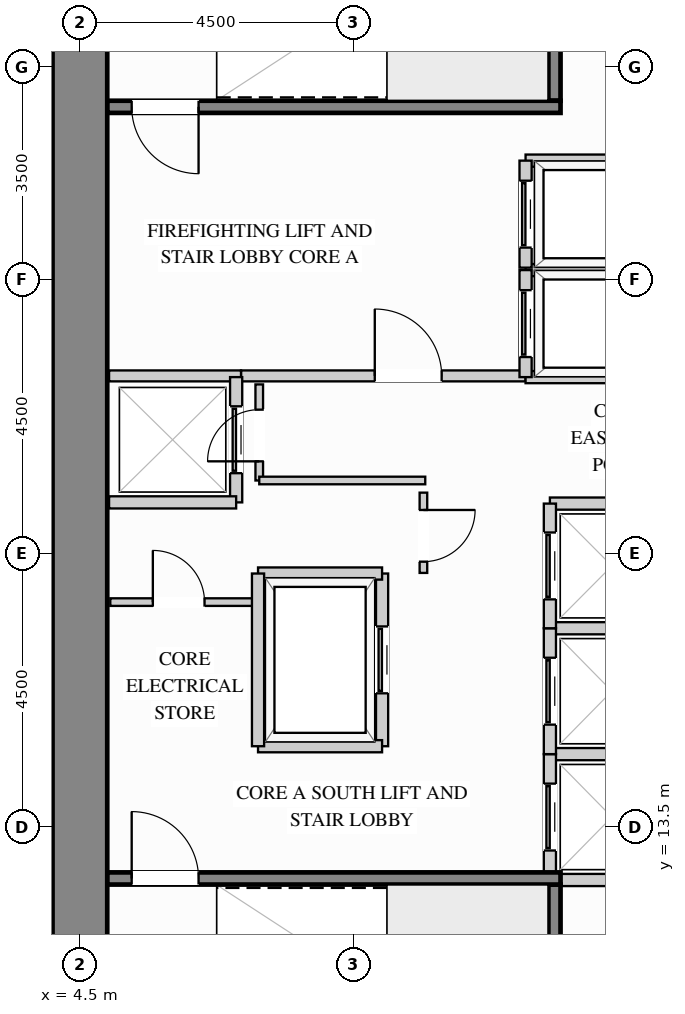
"""IFC4 building model, lengths in metres.
Left out: names, types, materials, properties, quantities, classifications, styles, units other than length and angle.
Written with IfcOpenShell. Run it as: python <this file> out.ifc"""

import sys

from ifc_helpers import new_model, si_unit, direction, frame, frame_2d, origin, place, context, subcontext, project, spatial, rectangle, extrude, source, transform, mapped, element, fill, save


model = new_model("IFC4")
c1 = context("Model", 3, precision=1e-05, world=origin(), true_north=direction((0.0, 1.0)))
c2 = subcontext(c1, "Body", "Model", "MODEL_VIEW")
j1 = project(units=[si_unit("LENGTHUNIT", "METRE"), si_unit("PLANEANGLEUNIT", "RADIAN")], contexts=[c1])
p1 = place(None, origin())
s1 = spatial("IfcSite", under=j1, at=p1, CompositionType="ELEMENT")
p2 = place(p1, origin())
s2 = spatial("IfcBuilding", under=s1, at=p2, CompositionType="ELEMENT")
p3 = place(p2, frame((0.0, 0.0, 54.9)))
s3 = spatial("IfcBuildingStorey", under=s2, at=p3, CompositionType="ELEMENT", Elevation=54.9)
m1 = source(origin(), c2, "Body", "SweptSolid", [
    extrude(rectangle(XDim=20.1, YDim=0.9, at=frame_2d((10.05, 0.0))), origin(), (0.0, 0.0, 1.0), 3.38),
])
p4 = place(p3, frame((4.5, 8.95, 0.0), z_axis=(0.0, 0.0, 1.0), x_axis=(0.0, 1.0, 0.0)))
e1 = element("IfcWall", 1, at=p4, inside=s3, PredefinedType="SHEAR", context=c2, shape_type="MappedRepresentation", body=[
    mapped(m1, transform((0.0, 0.0, 0.0), x_axis=(1.0, 0.0, 0.0), y_axis=(0.0, 1.0, 0.0), z_axis=(0.0, 0.0, 1.0))),
])
p5 = place(p3, frame((7.15, 20.92, 0.0), z_axis=(0.0, 0.0, 1.0), x_axis=(1.0, 0.0, 0.0)))
e2 = element("IfcWall", 2, at=p5, inside=s3, PredefinedType="PARTITIONING", context=c2, shape_type="SweptSolid", body=[
    extrude(rectangle(XDim=4.68, YDim=0.18, at=frame_2d((2.34, 0.0))), origin(), (0.0, 0.0, 1.0), 3.365),
])
p6 = place(p5, frame((2.2, 0.0, 0.0)))
e3 = element("IfcOpeningElement", 3, at=p6, cuts=e2, PredefinedType="OPENING", context=c2, shape_type="SweptSolid", body=[
    extrude(rectangle(XDim=1.1, YDim=2.15, at=frame_2d((0.55, 1.075))), frame((0.0, 0.1, 0.0), z_axis=(0.0, -1.0, 0.0), x_axis=(1.0, 0.0, 0.0)), (0.0, 0.0, 1.0), 0.2),
])
m2 = source(origin(), c2, "Body", "SweptSolid", [
    extrude(rectangle(XDim=2.17, YDim=0.18, at=frame_2d((1.085, 0.0))), origin(), (0.0, 0.0, 1.0), 3.365),
])
p7 = place(p3, frame((4.98, 20.92, 0.0), z_axis=(0.0, 0.0, 1.0), x_axis=(1.0, 0.0, 0.0)))
e4 = element("IfcWall", 4, at=p7, inside=s3, PredefinedType="PARTITIONING", context=c2, shape_type="MappedRepresentation", body=[
    mapped(m2, transform((0.0, 0.0, 0.0), x_axis=(1.0, 0.0, 0.0), y_axis=(0.0, 1.0, 0.0), z_axis=(0.0, 0.0, 1.0))),
])
p8 = place(p3, frame((10.15, 17.68, 0.0), z_axis=(0.0, 0.0, 1.0), x_axis=(0.0, 1.0, 0.0)))
e5 = element("IfcWall", 5, at=p8, inside=s3, PredefinedType="PARTITIONING", context=c2, shape_type="SweptSolid", body=[
    extrude(rectangle(XDim=1.32, YDim=0.125, at=frame_2d((0.66, 0.0))), origin(), (0.0, 0.0, 1.0), 3.365),
])
p9 = place(p8, frame((0.185, 0.0, 0.0)))
e6 = element("IfcOpeningElement", 6, at=p9, cuts=e5, PredefinedType="OPENING", context=c2, shape_type="SweptSolid", body=[
    extrude(rectangle(XDim=0.85, YDim=2.1, at=frame_2d((0.425, 1.05))), frame((0.0, 0.073, 0.0), z_axis=(0.0, -1.0, 0.0), x_axis=(1.0, 0.0, 0.0)), (0.0, 0.0, 1.0), 0.145),
])
p10 = place(p3, frame((7.45, 19.2, 0.0), z_axis=(0.0, 0.0, 1.0), x_axis=(0.0, 1.0, 0.0)))
e7 = element("IfcWall", 7, at=p10, inside=s3, PredefinedType="PARTITIONING", context=c2, shape_type="SweptSolid", body=[
    extrude(rectangle(XDim=1.58, YDim=0.125, at=frame_2d((0.79, 0.0))), origin(), (0.0, 0.0, 1.0), 3.365),
])
p11 = place(p10, frame((0.315, 0.0, 0.0)))
e8 = element("IfcOpeningElement", 8, at=p11, cuts=e7, PredefinedType="OPENING", context=c2, shape_type="SweptSolid", body=[
    extrude(rectangle(XDim=0.85, YDim=2.1, at=frame_2d((0.425, 1.05))), frame((0.0, 0.073, 0.0), z_axis=(0.0, -1.0, 0.0), x_axis=(1.0, 0.0, 0.0)), (0.0, 0.0, 1.0), 0.145),
])
m3 = source(origin(), c2, "Body", "SweptSolid", [
    extrude(rectangle(XDim=2.73, YDim=0.125, at=frame_2d((1.365, 0.0))), origin(), (0.0, 0.0, 1.0), 3.365),
])
p12 = place(p3, frame((7.45, 19.2, 0.0), z_axis=(0.0, 0.0, 1.0), x_axis=(1.0, 0.0, 0.0)))
e9 = element("IfcWall", 9, at=p12, inside=s3, PredefinedType="PARTITIONING", context=c2, shape_type="MappedRepresentation", body=[
    mapped(m3, transform((0.0, 0.0, 0.0), x_axis=(1.0, 0.0, 0.0), y_axis=(0.0, 1.0, 0.0), z_axis=(0.0, 0.0, 1.0))),
])
p13 = place(p3, frame((5.0, 17.2, 0.0), z_axis=(0.0, 0.0, 1.0), x_axis=(1.0, 0.0, 0.0)))
e10 = element("IfcWall", 10, at=p13, inside=s3, PredefinedType="PARTITIONING", context=c2, shape_type="SweptSolid", body=[
    extrude(rectangle(XDim=2.4, YDim=0.125, at=frame_2d((1.2, 0.0))), origin(), (0.0, 0.0, 1.0), 3.365),
])
p14 = place(p13, frame((0.7, 0.0, 0.0)))
e11 = element("IfcOpeningElement", 11, at=p14, cuts=e10, PredefinedType="OPENING", context=c2, shape_type="SweptSolid", body=[
    extrude(rectangle(XDim=0.85, YDim=2.1, at=frame_2d((0.425, 1.05))), frame((0.0, 0.073, 0.0), z_axis=(0.0, -1.0, 0.0), x_axis=(1.0, 0.0, 0.0)), (0.0, 0.0, 1.0), 0.145),
])
m4 = source(origin(), c2, "Body", "SweptSolid", [
    extrude(rectangle(XDim=2.19, YDim=0.2, at=frame_2d((1.095, 0.0))), origin(), (0.0, 0.0, 1.0), 3.365),
])
for number, where, z_axis, x_axis in (
    (12, (11.83, 22.66, 0.0), (0.0, 0.0, 1.0), (1.0, 0.0, 0.0)),
    (13, (11.83, 20.9, 0.0), (0.0, 0.0, 1.0), (1.0, 0.0, 0.0)),
):
    element("IfcWall", number, at=place(p3, frame(where, z_axis=z_axis, x_axis=x_axis)), inside=s3, PredefinedType="PARTITIONING", context=c2, shape_type="MappedRepresentation", body=[
        mapped(m4, transform((0.0, 0.0, 0.0), x_axis=(1.0, 0.0, 0.0), y_axis=(0.0, 1.0, 0.0), z_axis=(0.0, 0.0, 1.0))),
    ])
p15 = place(p3, frame((11.83, 20.9, 0.0), z_axis=(0.0, 0.0, 1.0), x_axis=(0.0, 1.0, 0.0)))
e14 = element("IfcWall", 14, at=p15, inside=s3, PredefinedType="PARTITIONING", context=c2, shape_type="SweptSolid", body=[
    extrude(rectangle(XDim=1.76, YDim=0.2, at=frame_2d((0.88, 0.0))), origin(), (0.0, 0.0, 1.0), 3.365),
])
p16 = place(p15, frame((0.33, 0.0, 0.0)))
e15 = element("IfcOpeningElement", 15, at=p16, cuts=e14, PredefinedType="OPENING", context=c2, shape_type="SweptSolid", body=[
    extrude(rectangle(XDim=1.1, YDim=2.2, at=frame_2d((0.55, 1.1))), frame((0.0, 0.11, 0.0), z_axis=(0.0, -1.0, 0.0), x_axis=(1.0, 0.0, 0.0)), (0.0, 0.0, 1.0), 0.22),
])
p17 = place(p3, frame((11.83, 24.46, 0.0), z_axis=(0.0, 0.0, 1.0), x_axis=(1.0, 0.0, 0.0)))
e16 = element("IfcWall", 16, at=p17, inside=s3, PredefinedType="PARTITIONING", context=c2, shape_type="MappedRepresentation", body=[
    mapped(m4, transform((0.0, 0.0, 0.0), x_axis=(1.0, 0.0, 0.0), y_axis=(0.0, 1.0, 0.0), z_axis=(0.0, 0.0, 1.0))),
])
p18 = place(p3, frame((11.83, 22.7, 0.0), z_axis=(0.0, 0.0, 1.0), x_axis=(0.0, 1.0, 0.0)))
e17 = element("IfcWall", 17, at=p18, inside=s3, PredefinedType="PARTITIONING", context=c2, shape_type="SweptSolid", body=[
    extrude(rectangle(XDim=1.76, YDim=0.2, at=frame_2d((0.88, 0.0))), origin(), (0.0, 0.0, 1.0), 3.365),
])
p19 = place(p18, frame((0.33, 0.0, 0.0)))
e18 = element("IfcOpeningElement", 18, at=p19, cuts=e17, PredefinedType="OPENING", context=c2, shape_type="SweptSolid", body=[
    extrude(rectangle(XDim=1.1, YDim=2.2, at=frame_2d((0.55, 1.1))), frame((0.0, 0.11, 0.0), z_axis=(0.0, -1.0, 0.0), x_axis=(1.0, 0.0, 0.0)), (0.0, 0.0, 1.0), 0.22),
])
m5 = source(origin(), c2, "Body", "SweptSolid", [
    extrude(rectangle(XDim=1.79, YDim=0.2, at=frame_2d((0.895, 0.0))), origin(), (0.0, 0.0, 1.0), 3.365),
])
for number, where, z_axis, x_axis in (
    (19, (12.23, 14.7, 0.0), (0.0, 0.0, 1.0), (1.0, 0.0, 0.0)),
    (20, (12.23, 12.63, 0.0), (0.0, 0.0, 1.0), (1.0, 0.0, 0.0)),
):
    element("IfcWall", number, at=place(p3, frame(where, z_axis=z_axis, x_axis=x_axis)), inside=s3, PredefinedType="PARTITIONING", context=c2, shape_type="MappedRepresentation", body=[
        mapped(m5, transform((0.0, 0.0, 0.0), x_axis=(1.0, 0.0, 0.0), y_axis=(0.0, 1.0, 0.0), z_axis=(0.0, 0.0, 1.0))),
    ])
p20 = place(p3, frame((12.23, 12.63, 0.0), z_axis=(0.0, 0.0, 1.0), x_axis=(0.0, 1.0, 0.0)))
e21 = element("IfcWall", 21, at=p20, inside=s3, PredefinedType="PARTITIONING", context=c2, shape_type="SweptSolid", body=[
    extrude(rectangle(XDim=2.07, YDim=0.2, at=frame_2d((1.035, 0.0))), origin(), (0.0, 0.0, 1.0), 3.365),
])
p21 = place(p20, frame((0.485, 0.0, 0.0)))
e22 = element("IfcOpeningElement", 22, at=p21, cuts=e21, PredefinedType="OPENING", context=c2, shape_type="SweptSolid", body=[
    extrude(rectangle(XDim=1.1, YDim=2.2, at=frame_2d((0.55, 1.1))), frame((0.0, 0.11, 0.0), z_axis=(0.0, -1.0, 0.0), x_axis=(1.0, 0.0, 0.0)), (0.0, 0.0, 1.0), 0.22),
])
p22 = place(p3, frame((12.23, 16.77, 0.0), z_axis=(0.0, 0.0, 1.0), x_axis=(1.0, 0.0, 0.0)))
e23 = element("IfcWall", 23, at=p22, inside=s3, PredefinedType="PARTITIONING", context=c2, shape_type="MappedRepresentation", body=[
    mapped(m5, transform((0.0, 0.0, 0.0), x_axis=(1.0, 0.0, 0.0), y_axis=(0.0, 1.0, 0.0), z_axis=(0.0, 0.0, 1.0))),
])
p23 = place(p3, frame((12.23, 14.7, 0.0), z_axis=(0.0, 0.0, 1.0), x_axis=(0.0, 1.0, 0.0)))
e24 = element("IfcWall", 24, at=p23, inside=s3, PredefinedType="PARTITIONING", context=c2, shape_type="SweptSolid", body=[
    extrude(rectangle(XDim=2.07, YDim=0.2, at=frame_2d((1.035, 0.0))), origin(), (0.0, 0.0, 1.0), 3.365),
])
p24 = place(p23, frame((0.485, 0.0, 0.0)))
e25 = element("IfcOpeningElement", 25, at=p24, cuts=e24, PredefinedType="OPENING", context=c2, shape_type="SweptSolid", body=[
    extrude(rectangle(XDim=1.1, YDim=2.2, at=frame_2d((0.55, 1.1))), frame((0.0, 0.11, 0.0), z_axis=(0.0, -1.0, 0.0), x_axis=(1.0, 0.0, 0.0)), (0.0, 0.0, 1.0), 0.22),
])
p25 = place(p3, frame((12.23, 18.82, 0.0), z_axis=(0.0, 0.0, 1.0), x_axis=(1.0, 0.0, 0.0)))
e26 = element("IfcWall", 26, at=p25, inside=s3, PredefinedType="PARTITIONING", context=c2, shape_type="MappedRepresentation", body=[
    mapped(m5, transform((0.0, 0.0, 0.0), x_axis=(1.0, 0.0, 0.0), y_axis=(0.0, 1.0, 0.0), z_axis=(0.0, 0.0, 1.0))),
])
p26 = place(p3, frame((12.23, 16.77, 0.0), z_axis=(0.0, 0.0, 1.0), x_axis=(0.0, 1.0, 0.0)))
e27 = element("IfcWall", 27, at=p26, inside=s3, PredefinedType="PARTITIONING", context=c2, shape_type="SweptSolid", body=[
    extrude(rectangle(XDim=2.05, YDim=0.2, at=frame_2d((1.025, 0.0))), origin(), (0.0, 0.0, 1.0), 3.365),
])
p27 = place(p26, frame((0.475, 0.0, 0.0)))
e28 = element("IfcOpeningElement", 28, at=p27, cuts=e27, PredefinedType="OPENING", context=c2, shape_type="SweptSolid", body=[
    extrude(rectangle(XDim=1.1, YDim=2.2, at=frame_2d((0.55, 1.1))), frame((0.0, 0.11, 0.0), z_axis=(0.0, -1.0, 0.0), x_axis=(1.0, 0.0, 0.0)), (0.0, 0.0, 1.0), 0.22),
])
p28 = place(p3, frame((7.07, 18.84, 0.0), z_axis=(0.0, 0.0, 1.0), x_axis=(0.0, 1.0, 0.0)))
e29 = element("IfcWall", 29, at=p28, inside=s3, PredefinedType="PARTITIONING", context=c2, shape_type="SweptSolid", body=[
    extrude(rectangle(XDim=2.06, YDim=0.2, at=frame_2d((1.03, 0.0))), origin(), (0.0, 0.0, 1.0), 3.365),
])
p29 = place(p28, frame((0.48, 0.0, 0.0)))
e30 = element("IfcOpeningElement", 30, at=p29, cuts=e29, PredefinedType="OPENING", context=c2, shape_type="SweptSolid", body=[
    extrude(rectangle(XDim=1.1, YDim=2.2, at=frame_2d((0.55, 1.1))), frame((0.0, 0.11, 0.0), z_axis=(0.0, -1.0, 0.0), x_axis=(1.0, 0.0, 0.0)), (0.0, 0.0, 1.0), 0.22),
])
m6 = source(origin(), c2, "Body", "SweptSolid", [
    extrude(rectangle(XDim=2.09, YDim=0.2, at=frame_2d((1.045, 0.0))), origin(), (0.0, 0.0, 1.0), 3.365),
])
p30 = place(p3, frame((4.98, 18.84, 0.0), z_axis=(0.0, 0.0, 1.0), x_axis=(1.0, 0.0, 0.0)))
e31 = element("IfcWall", 31, at=p30, inside=s3, PredefinedType="PARTITIONING", context=c2, shape_type="MappedRepresentation", body=[
    mapped(m6, transform((0.0, 0.0, 0.0), x_axis=(1.0, 0.0, 0.0), y_axis=(0.0, 1.0, 0.0), z_axis=(0.0, 0.0, 1.0))),
])
p31 = place(p3, frame((9.47, 14.83, 0.0), z_axis=(0.0, 0.0, 1.0), x_axis=(0.0, 1.0, 0.0)))
e32 = element("IfcWall", 32, at=p31, inside=s3, PredefinedType="PARTITIONING", context=c2, shape_type="SweptSolid", body=[
    extrude(rectangle(XDim=2.84, YDim=0.2, at=frame_2d((1.42, 0.0))), origin(), (0.0, 0.0, 1.0), 3.365),
])
p32 = place(p31, frame((0.87, 0.0, 0.0)))
e33 = element("IfcOpeningElement", 33, at=p32, cuts=e32, PredefinedType="OPENING", context=c2, shape_type="SweptSolid", body=[
    extrude(rectangle(XDim=1.1, YDim=2.2, at=frame_2d((0.55, 1.1))), frame((0.0, 0.11, 0.0), z_axis=(0.0, -1.0, 0.0), x_axis=(1.0, 0.0, 0.0)), (0.0, 0.0, 1.0), 0.22),
])
m7 = source(origin(), c2, "Body", "SweptSolid", [
    extrude(rectangle(XDim=2.04, YDim=0.2, at=frame_2d((1.02, 0.0))), origin(), (0.0, 0.0, 1.0), 3.365),
])
for number, where, z_axis, x_axis in (
    (34, (7.43, 17.67, 0.0), (0.0, 0.0, 1.0), (1.0, 0.0, 0.0)),
    (35, (7.43, 14.83, 0.0), (0.0, 0.0, 1.0), (1.0, 0.0, 0.0)),
):
    element("IfcWall", number, at=place(p3, frame(where, z_axis=z_axis, x_axis=x_axis)), inside=s3, PredefinedType="PARTITIONING", context=c2, shape_type="MappedRepresentation", body=[
        mapped(m7, transform((0.0, 0.0, 0.0), x_axis=(1.0, 0.0, 0.0), y_axis=(0.0, 1.0, 0.0), z_axis=(0.0, 0.0, 1.0))),
    ])
m8 = source(origin(), c2, "Body", "SweptSolid", [
    extrude(rectangle(XDim=2.84, YDim=0.2, at=frame_2d((1.42, 0.0))), origin(), (0.0, 0.0, 1.0), 3.365),
])
p33 = place(p3, frame((7.43, 14.83, 0.0), z_axis=(0.0, 0.0, 1.0), x_axis=(0.0, 1.0, 0.0)))
e36 = element("IfcWall", 36, at=p33, inside=s3, PredefinedType="PARTITIONING", context=c2, shape_type="MappedRepresentation", body=[
    mapped(m8, transform((0.0, 0.0, 0.0), x_axis=(1.0, 0.0, 0.0), y_axis=(0.0, 1.0, 0.0), z_axis=(0.0, 0.0, 1.0))),
])
m9 = source(origin(), c2, "Body", "SweptSolid", [
    extrude(rectangle(XDim=3.603, YDim=0.2, at=frame_2d((1.802, 0.0))), origin(), (0.0, 0.0, 1.0), 3.38),
])
p34 = place(p3, frame((12.305, 8.952, 0.0), z_axis=(0.0, 0.0, 1.0), x_axis=(0.0, 1.0, 0.0)))
e37 = element("IfcWall", 37, at=p34, inside=s3, PredefinedType="SHEAR", context=c2, shape_type="MappedRepresentation", body=[
    mapped(m9, transform((0.0, 0.0, 0.0), x_axis=(1.0, 0.0, 0.0), y_axis=(0.0, 1.0, 0.0), z_axis=(0.0, 0.0, 1.0))),
])
p35 = place(p3, frame((4.952, 12.655, 0.0), z_axis=(0.0, 0.0, 1.0), x_axis=(1.0, 0.0, 0.0)))
e38 = element("IfcWall", 38, at=p35, inside=s3, PredefinedType="SHEAR", context=c2, shape_type="SweptSolid", body=[
    extrude(rectangle(XDim=7.453, YDim=0.2, at=frame_2d((3.727, 0.0))), origin(), (0.0, 0.0, 1.0), 3.38),
])
p36 = place(p35, frame((0.4, 0.0, 0.0)))
e39 = element("IfcOpeningElement", 39, at=p36, cuts=e38, PredefinedType="OPENING", context=c2, shape_type="SweptSolid", body=[
    extrude(rectangle(XDim=1.1, YDim=2.15, at=frame_2d((0.55, 1.075))), frame((0.0, 0.11, 0.0), z_axis=(0.0, -1.0, 0.0), x_axis=(1.0, 0.0, 0.0)), (0.0, 0.0, 1.0), 0.22),
])
p37 = place(p3, frame((12.305, 25.445, 0.0), z_axis=(0.0, 0.0, 1.0), x_axis=(0.0, 1.0, 0.0)))
e40 = element("IfcWall", 40, at=p37, inside=s3, PredefinedType="SHEAR", context=c2, shape_type="MappedRepresentation", body=[
    mapped(m9, transform((0.0, 0.0, 0.0), x_axis=(1.0, 0.0, 0.0), y_axis=(0.0, 1.0, 0.0), z_axis=(0.0, 0.0, 1.0))),
])
p38 = place(p3, frame((4.952, 25.345, 0.0), z_axis=(0.0, 0.0, 1.0), x_axis=(1.0, 0.0, 0.0)))
e41 = element("IfcWall", 41, at=p38, inside=s3, PredefinedType="SHEAR", context=c2, shape_type="SweptSolid", body=[
    extrude(rectangle(XDim=7.453, YDim=0.2, at=frame_2d((3.727, 0.0))), origin(), (0.0, 0.0, 1.0), 3.38),
])
p39 = place(p38, frame((0.4, 0.0, 0.0)))
e42 = element("IfcOpeningElement", 42, at=p39, cuts=e41, PredefinedType="OPENING", context=c2, shape_type="SweptSolid", body=[
    extrude(rectangle(XDim=1.1, YDim=2.15, at=frame_2d((0.55, 1.075))), frame((0.0, 0.11, 0.0), z_axis=(0.0, -1.0, 0.0), x_axis=(1.0, 0.0, 0.0)), (0.0, 0.0, 1.0), 0.22),
])
m10 = source(origin(), c2, "Body", "SweptSolid", [
    extrude(rectangle(XDim=1.1, YDim=2.15, at=frame_2d((0.55, 1.075))), frame((0.0, 0.025, 0.0), z_axis=(0.0, -1.0, 0.0), x_axis=(1.0, 0.0, 0.0)), (0.0, 0.0, 1.0), 0.05),
])
p40 = place(p6, origin())
e43 = element("IfcDoor", 43, at=p40, inside=s3, OperationType="SINGLE_SWING_LEFT", PredefinedType="DOOR", context=c2, shape_type="MappedRepresentation", body=[
    mapped(m10, transform((0.0, 0.0, 0.0), x_axis=(1.0, 0.0, 0.0), y_axis=(0.0, 1.0, 0.0), z_axis=(0.0, 0.0, 1.0))),
])
fill(e3, e43)
m11 = source(origin(), c2, "Body", "SweptSolid", [
    extrude(rectangle(XDim=1.1, YDim=2.2, at=frame_2d((0.55, 1.1))), frame((0.0, 0.025, 0.0), z_axis=(0.0, -1.0, 0.0), x_axis=(1.0, 0.0, 0.0)), (0.0, 0.0, 1.0), 0.05),
])
p41 = place(p16, origin())
e44 = element("IfcDoor", 44, at=p41, inside=s3, OperationType="SLIDING_TO_LEFT", PredefinedType="DOOR", context=c2, shape_type="MappedRepresentation", body=[
    mapped(m11, transform((0.0, 0.0, 0.0), x_axis=(1.0, 0.0, 0.0), y_axis=(0.0, 1.0, 0.0), z_axis=(0.0, 0.0, 1.0))),
])
fill(e15, e44)
p42 = place(p19, origin())
e45 = element("IfcDoor", 45, at=p42, inside=s3, OperationType="SLIDING_TO_LEFT", PredefinedType="DOOR", context=c2, shape_type="MappedRepresentation", body=[
    mapped(m11, transform((0.0, 0.0, 0.0), x_axis=(1.0, 0.0, 0.0), y_axis=(0.0, 1.0, 0.0), z_axis=(0.0, 0.0, 1.0))),
])
fill(e18, e45)
p43 = place(p21, origin())
e46 = element("IfcDoor", 46, at=p43, inside=s3, OperationType="SLIDING_TO_LEFT", PredefinedType="DOOR", context=c2, shape_type="MappedRepresentation", body=[
    mapped(m11, transform((0.0, 0.0, 0.0), x_axis=(1.0, 0.0, 0.0), y_axis=(0.0, 1.0, 0.0), z_axis=(0.0, 0.0, 1.0))),
])
fill(e22, e46)
p44 = place(p24, origin())
e47 = element("IfcDoor", 47, at=p44, inside=s3, OperationType="SLIDING_TO_LEFT", PredefinedType="DOOR", context=c2, shape_type="MappedRepresentation", body=[
    mapped(m11, transform((0.0, 0.0, 0.0), x_axis=(1.0, 0.0, 0.0), y_axis=(0.0, 1.0, 0.0), z_axis=(0.0, 0.0, 1.0))),
])
fill(e25, e47)
p45 = place(p27, origin())
e48 = element("IfcDoor", 48, at=p45, inside=s3, OperationType="SLIDING_TO_LEFT", PredefinedType="DOOR", context=c2, shape_type="MappedRepresentation", body=[
    mapped(m11, transform((0.0, 0.0, 0.0), x_axis=(1.0, 0.0, 0.0), y_axis=(0.0, 1.0, 0.0), z_axis=(0.0, 0.0, 1.0))),
])
fill(e28, e48)
p46 = place(p29, origin())
e49 = element("IfcDoor", 49, at=p46, inside=s3, OperationType="SLIDING_TO_LEFT", PredefinedType="DOOR", context=c2, shape_type="MappedRepresentation", body=[
    mapped(m11, transform((0.0, 0.0, 0.0), x_axis=(1.0, 0.0, 0.0), y_axis=(0.0, 1.0, 0.0), z_axis=(0.0, 0.0, 1.0))),
])
fill(e30, e49)
p47 = place(p32, origin())
e50 = element("IfcDoor", 50, at=p47, inside=s3, OperationType="SLIDING_TO_LEFT", PredefinedType="DOOR", context=c2, shape_type="MappedRepresentation", body=[
    mapped(m11, transform((0.0, 0.0, 0.0), x_axis=(1.0, 0.0, 0.0), y_axis=(0.0, 1.0, 0.0), z_axis=(0.0, 0.0, 1.0))),
])
fill(e33, e50)
m12 = source(origin(), c2, "Body", "SweptSolid", [
    extrude(rectangle(XDim=0.85, YDim=2.1, at=frame_2d((0.425, 1.05))), frame((0.0, 0.025, 0.0), z_axis=(0.0, -1.0, 0.0), x_axis=(1.0, 0.0, 0.0)), (0.0, 0.0, 1.0), 0.05),
])
p48 = place(p9, origin())
e51 = element("IfcDoor", 51, at=p48, inside=s3, OperationType="SINGLE_SWING_RIGHT", PredefinedType="DOOR", context=c2, shape_type="MappedRepresentation", body=[
    mapped(m12, transform((0.0, 0.0, 0.0), x_axis=(1.0, 0.0, 0.0), y_axis=(0.0, 1.0, 0.0), z_axis=(0.0, 0.0, 1.0))),
])
fill(e6, e51)
p49 = place(p14, origin())
e52 = element("IfcDoor", 52, at=p49, inside=s3, OperationType="SINGLE_SWING_LEFT", PredefinedType="DOOR", context=c2, shape_type="MappedRepresentation", body=[
    mapped(m12, transform((0.0, 0.0, 0.0), x_axis=(1.0, 0.0, 0.0), y_axis=(0.0, 1.0, 0.0), z_axis=(0.0, 0.0, 1.0))),
])
fill(e11, e52)
p50 = place(p11, origin())
e53 = element("IfcDoor", 53, at=p50, inside=s3, OperationType="SINGLE_SWING_LEFT", PredefinedType="DOOR", context=c2, shape_type="MappedRepresentation", body=[
    mapped(m12, transform((0.0, 0.0, 0.0), x_axis=(1.0, 0.0, 0.0), y_axis=(0.0, 1.0, 0.0), z_axis=(0.0, 0.0, 1.0))),
])
fill(e8, e53)
m13 = source(origin(), c2, "Body", "SweptSolid", [
    extrude(rectangle(XDim=1.1, YDim=2.15, at=frame_2d((0.55, 1.075))), frame((0.0, 0.025, 0.0), z_axis=(0.0, -1.0, 0.0), x_axis=(1.0, 0.0, 0.0)), (0.0, 0.0, 1.0), 0.05),
])
p51 = place(p36, origin())
e54 = element("IfcDoor", 54, at=p51, inside=s3, OperationType="SINGLE_SWING_LEFT", PredefinedType="DOOR", context=c2, shape_type="MappedRepresentation", body=[
    mapped(m13, transform((0.0, 0.0, 0.0), x_axis=(1.0, 0.0, 0.0), y_axis=(0.0, 1.0, 0.0), z_axis=(0.0, 0.0, 1.0))),
])
fill(e39, e54)
p52 = place(p39, origin())
e55 = element("IfcDoor", 55, at=p52, inside=s3, OperationType="SINGLE_SWING_RIGHT", PredefinedType="DOOR", context=c2, shape_type="MappedRepresentation", body=[
    mapped(m13, transform((0.0, 0.0, 0.0), x_axis=(1.0, 0.0, 0.0), y_axis=(0.0, 1.0, 0.0), z_axis=(0.0, 0.0, 1.0))),
])
fill(e42, e55)
save(model, sys.argv[1])
